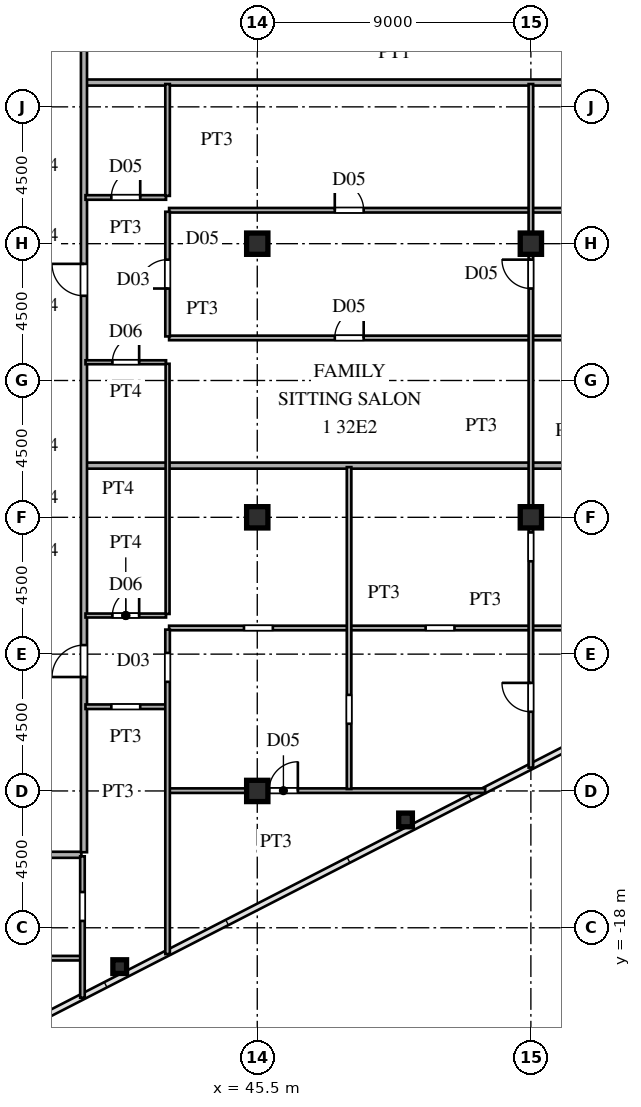
"""IFC4 building model, lengths in metres.
Left out: names, types, materials, properties, quantities, classifications, styles, units other than length and angle.
Written with IfcOpenShell. Run it as: python <this file> out.ifc"""

import sys

from ifc_helpers import new_model, si_unit, direction, frame, frame_2d, origin, origin_2d, place, context, subcontext, project, spatial, rectangle, hollow_rectangle, i_section, extrude, source, transform, mapped, element, fill, save


model = new_model("IFC4")
c1 = context("Model", 3, precision=1e-05, world=origin(), true_north=direction((0.0, 1.0)))
c2 = subcontext(c1, "Body", "Model", "MODEL_VIEW")
j1 = project(units=[si_unit("LENGTHUNIT", "METRE"), si_unit("PLANEANGLEUNIT", "RADIAN")], contexts=[c1])
p1 = place(None, origin())
s1 = spatial("IfcSite", under=j1, at=p1, CompositionType="ELEMENT")
p2 = place(p1, origin())
s2 = spatial("IfcBuilding", under=s1, at=p2, CompositionType="ELEMENT")
p3 = place(p2, frame((0.0, 0.0, 121.2)))
s3 = spatial("IfcBuildingStorey", under=s2, at=p3, CompositionType="ELEMENT", Elevation=121.2)
m1 = source(origin(), c2, "Body", "SweptSolid", [
    extrude(i_section(OverallWidth=0.7, OverallDepth=0.7, WebThickness=0.028, FlangeThickness=0.045, at=origin_2d()), origin(), (0.0, 0.0, 1.0), 3.6),
])
for number, where, z_axis, x_axis in (
    (1, (45.5, -13.5, 0.0), (0.0, 0.0, 1.0), (1.0, 0.0, 0.0)),
    (2, (45.5, -4.5, 0.0), (0.0, 0.0, 1.0), (1.0, 0.0, 0.0)),
    (3, (45.5, 4.5, 0.0), (0.0, 0.0, 1.0), (1.0, 0.0, 0.0)),
    (4, (54.5, -4.5, 0.0), (0.0, 0.0, 1.0), (1.0, 0.0, 0.0)),
    (5, (54.5, 4.5, 0.0), (0.0, 0.0, 1.0), (1.0, 0.0, 0.0)),
):
    element("IfcColumn", number, at=place(p3, frame(where, z_axis=z_axis, x_axis=x_axis)), inside=s3, PredefinedType="COLUMN", context=c2, shape_type="MappedRepresentation", body=[
        mapped(m1, transform((0.0, 0.0, 0.0), scale=1.0)),
    ])
m2 = source(origin(), c2, "Body", "SweptSolid", [
    extrude(hollow_rectangle(XDim=0.45, YDim=0.45, WallThickness=0.018, at=origin_2d()), origin(), (0.0, 0.0, 1.0), 3.6),
])
for number, where, z_axis, x_axis in (
    (6, (40.976, -19.278, 0.0), (0.0, 0.0, 1.0), (1.0, 0.0, 0.0)),
    (7, (50.377, -14.453, 0.0), (0.0, 0.0, 1.0), (1.0, 0.0, 0.0)),
):
    element("IfcColumn", number, at=place(p3, frame(where, z_axis=z_axis, x_axis=x_axis)), inside=s3, PredefinedType="COLUMN", context=c2, shape_type="MappedRepresentation", body=[
        mapped(m2, transform((0.0, 0.0, 0.0), scale=1.0)),
    ])
p4 = place(p3, frame((27.465, -19.0, 0.0), z_axis=(0.0, 0.0, 1.0), x_axis=(1.0, 0.0, 0.0)))
e8 = element("IfcWall", 8, at=p4, inside=s3, PredefinedType="PARTITIONING", context=c2, shape_type="SweptSolid", body=[
    extrude(rectangle(XDim=12.235, YDim=0.15, at=frame_2d((6.117, 0.0))), origin(), (0.0, 0.0, 1.0), 3.38),
])
p5 = place(p4, frame((5.685, 0.0, 0.0)))
e9 = element("IfcOpeningElement", 9, at=p5, cuts=e8, PredefinedType="OPENING", context=c2, shape_type="SweptSolid", body=[
    extrude(rectangle(XDim=0.95, YDim=2.15, at=frame_2d((0.475, 1.075))), frame((0.0, 0.085, 0.0), z_axis=(0.0, -1.0, 0.0), x_axis=(1.0, 0.0, 0.0)), (0.0, 0.0, 1.0), 0.17),
])
p6 = place(p3, frame((36.585, -15.6, 0.0), z_axis=(0.0, 0.0, 1.0), x_axis=(1.0, 0.0, 0.0)))
e10 = element("IfcWall", 10, at=p6, inside=s3, PredefinedType="PARTITIONING", context=c2, shape_type="SweptSolid", body=[
    extrude(rectangle(XDim=3.13, YDim=0.2, at=frame_2d((1.565, 0.0))), origin(), (0.0, 0.0, 1.0), 3.38),
])
p7 = place(p3, frame((42.6, -13.49, 0.0), z_axis=(0.0, 0.0, 1.0), x_axis=(1.0, 0.0, 0.0)))
e11 = element("IfcWall", 11, at=p7, inside=s3, PredefinedType="PARTITIONING", context=c2, shape_type="SweptSolid", body=[
    extrude(rectangle(XDim=10.397, YDim=0.15, at=frame_2d((5.198, 0.0))), origin(), (0.0, 0.0, 1.0), 2.78),
])
p8 = place(p7, frame((3.285, 0.0, 0.0)))
e12 = element("IfcOpeningElement", 12, at=p8, cuts=e11, PredefinedType="OPENING", context=c2, shape_type="SweptSolid", body=[
    extrude(rectangle(XDim=0.95, YDim=2.15, at=frame_2d((0.475, 1.075))), frame((0.0, 0.085, 0.0), z_axis=(0.0, -1.0, 0.0), x_axis=(1.0, 0.0, 0.0)), (0.0, 0.0, 1.0), 0.17),
])
p9 = place(p3, frame((39.85, -10.73, 0.0), z_axis=(0.0, 0.0, 1.0), x_axis=(1.0, 0.0, 0.0)))
e13 = element("IfcWall", 13, at=p9, inside=s3, PredefinedType="PARTITIONING", context=c2, shape_type="SweptSolid", body=[
    extrude(rectangle(XDim=2.65, YDim=0.15, at=frame_2d((1.325, 0.0))), origin(), (0.0, 0.0, 1.0), 3.38),
])
p10 = place(p9, frame((0.85, 0.0, 0.0)))
e14 = element("IfcOpeningElement", 14, at=p10, cuts=e13, PredefinedType="OPENING", context=c2, shape_type="SweptSolid", body=[
    extrude(rectangle(XDim=0.95, YDim=2.15, at=frame_2d((0.475, 1.075))), frame((0.0, 0.085, 0.0), z_axis=(0.0, -1.0, 0.0), x_axis=(1.0, 0.0, 0.0)), (0.0, 0.0, 1.0), 0.17),
])
p11 = place(p3, frame((42.6, -8.14, 0.0), z_axis=(0.0, 0.0, 1.0), x_axis=(1.0, 0.0, 0.0)))
e15 = element("IfcWall", 15, at=p11, inside=s3, PredefinedType="PARTITIONING", context=c2, shape_type="SweptSolid", body=[
    extrude(rectangle(XDim=20.81, YDim=0.15, at=frame_2d((10.405, 0.0))), origin(), (0.0, 0.0, 1.0), 3.38),
])
p12 = place(p11, frame((2.462, 0.0, 0.0)))
e16 = element("IfcOpeningElement", 16, at=p12, cuts=e15, PredefinedType="OPENING", context=c2, shape_type="SweptSolid", body=[
    extrude(rectangle(XDim=0.95, YDim=2.15, at=frame_2d((0.475, 1.075))), frame((0.0, 0.085, 0.0), z_axis=(0.0, -1.0, 0.0), x_axis=(1.0, 0.0, 0.0)), (0.0, 0.0, 1.0), 0.17),
])
p13 = place(p11, frame((8.438, 0.0, 0.0)))
e17 = element("IfcOpeningElement", 17, at=p13, cuts=e15, PredefinedType="OPENING", context=c2, shape_type="SweptSolid", body=[
    extrude(rectangle(XDim=0.95, YDim=2.15, at=frame_2d((0.475, 1.075))), frame((0.0, 0.085, 0.0), z_axis=(0.0, -1.0, 0.0), x_axis=(1.0, 0.0, 0.0)), (0.0, 0.0, 1.0), 0.17),
])
p14 = place(p3, frame((39.85, -7.73, 0.0), z_axis=(0.0, 0.0, 1.0), x_axis=(1.0, 0.0, 0.0)))
e18 = element("IfcWall", 18, at=p14, inside=s3, PredefinedType="PARTITIONING", context=c2, shape_type="SweptSolid", body=[
    extrude(rectangle(XDim=2.65, YDim=0.13, at=frame_2d((1.325, 0.0))), origin(), (0.0, 0.0, 1.0), 3.38),
])
p15 = place(p14, frame((0.885, 0.0, 0.0)))
e19 = element("IfcOpeningElement", 19, at=p15, cuts=e18, PredefinedType="OPENING", context=c2, shape_type="SweptSolid", body=[
    extrude(rectangle(XDim=0.88, YDim=2.1, at=frame_2d((0.44, 1.05))), frame((0.0, 0.075, 0.0), z_axis=(0.0, -1.0, 0.0), x_axis=(1.0, 0.0, 0.0)), (0.0, 0.0, 1.0), 0.15),
])
p16 = place(p3, frame((39.88, -2.8, 0.0), z_axis=(0.0, 0.0, 1.0), x_axis=(1.0, 0.0, 0.0)))
e20 = element("IfcWall", 20, at=p16, inside=s3, PredefinedType="PARTITIONING", context=c2, shape_type="SweptSolid", body=[
    extrude(rectangle(XDim=29.625, YDim=0.2, at=frame_2d((14.812, 0.0))), origin(), (0.0, 0.0, 1.0), 3.38),
])
p17 = place(p3, frame((39.85, 0.6, 0.0), z_axis=(0.0, 0.0, 1.0), x_axis=(1.0, 0.0, 0.0)))
e21 = element("IfcWall", 21, at=p17, inside=s3, PredefinedType="PARTITIONING", context=c2, shape_type="SweptSolid", body=[
    extrude(rectangle(XDim=2.65, YDim=0.13, at=frame_2d((1.325, 0.0))), origin(), (0.0, 0.0, 1.0), 3.38),
])
p18 = place(p17, frame((0.885, 0.0, 0.0)))
e22 = element("IfcOpeningElement", 22, at=p18, cuts=e21, PredefinedType="OPENING", context=c2, shape_type="SweptSolid", body=[
    extrude(rectangle(XDim=0.88, YDim=2.1, at=frame_2d((0.44, 1.05))), frame((0.0, 0.075, 0.0), z_axis=(0.0, -1.0, 0.0), x_axis=(1.0, 0.0, 0.0)), (0.0, 0.0, 1.0), 0.15),
])
p19 = place(p3, frame((42.6, 1.4, 0.0), z_axis=(0.0, 0.0, 1.0), x_axis=(1.0, 0.0, 0.0)))
e23 = element("IfcWall", 23, at=p19, inside=s3, PredefinedType="PARTITIONING", context=c2, shape_type="SweptSolid", body=[
    extrude(rectangle(XDim=26.935, YDim=0.15, at=frame_2d((13.467, 0.0))), origin(), (0.0, 0.0, 1.0), 3.38),
])
p20 = place(p19, frame((5.45, 0.0, 0.0)))
e24 = element("IfcOpeningElement", 24, at=p20, cuts=e23, PredefinedType="OPENING", context=c2, shape_type="SweptSolid", body=[
    extrude(rectangle(XDim=0.95, YDim=2.15, at=frame_2d((0.475, 1.075))), frame((0.0, 0.085, 0.0), z_axis=(0.0, -1.0, 0.0), x_axis=(1.0, 0.0, 0.0)), (0.0, 0.0, 1.0), 0.17),
])
p21 = place(p19, frame((14.275, 0.0, 0.0)))
e25 = element("IfcOpeningElement", 25, at=p21, cuts=e23, PredefinedType="OPENING", context=c2, shape_type="SweptSolid", body=[
    extrude(rectangle(XDim=0.95, YDim=2.15, at=frame_2d((0.475, 1.075))), frame((0.0, 0.085, 0.0), z_axis=(0.0, -1.0, 0.0), x_axis=(1.0, 0.0, 0.0)), (0.0, 0.0, 1.0), 0.17),
])
p22 = place(p3, frame((42.6, 5.6, 0.0), z_axis=(0.0, 0.0, 1.0), x_axis=(1.0, 0.0, 0.0)))
e26 = element("IfcWall", 26, at=p22, inside=s3, PredefinedType="PARTITIONING", context=c2, shape_type="SweptSolid", body=[
    extrude(rectangle(XDim=25.766, YDim=0.15, at=frame_2d((12.883, 0.0))), origin(), (0.0, 0.0, 1.0), 3.38),
])
p23 = place(p22, frame((5.45, 0.0, 0.0)))
e27 = element("IfcOpeningElement", 27, at=p23, cuts=e26, PredefinedType="OPENING", context=c2, shape_type="SweptSolid", body=[
    extrude(rectangle(XDim=0.95, YDim=2.15, at=frame_2d((0.475, 1.075))), frame((0.0, 0.085, 0.0), z_axis=(0.0, -1.0, 0.0), x_axis=(1.0, 0.0, 0.0)), (0.0, 0.0, 1.0), 0.17),
])
p24 = place(p22, frame((14.275, 0.0, 0.0)))
e28 = element("IfcOpeningElement", 28, at=p24, cuts=e26, PredefinedType="OPENING", context=c2, shape_type="SweptSolid", body=[
    extrude(rectangle(XDim=0.95, YDim=2.15, at=frame_2d((0.475, 1.075))), frame((0.0, 0.085, 0.0), z_axis=(0.0, -1.0, 0.0), x_axis=(1.0, 0.0, 0.0)), (0.0, 0.0, 1.0), 0.17),
])
p25 = place(p3, frame((39.85, 6.02, 0.0), z_axis=(0.0, 0.0, 1.0), x_axis=(1.0, 0.0, 0.0)))
e29 = element("IfcWall", 29, at=p25, inside=s3, PredefinedType="PARTITIONING", context=c2, shape_type="SweptSolid", body=[
    extrude(rectangle(XDim=2.65, YDim=0.15, at=frame_2d((1.325, 0.0))), origin(), (0.0, 0.0, 1.0), 3.38),
])
p26 = place(p25, frame((0.85, 0.0, 0.0)))
e30 = element("IfcOpeningElement", 30, at=p26, cuts=e29, PredefinedType="OPENING", context=c2, shape_type="SweptSolid", body=[
    extrude(rectangle(XDim=0.95, YDim=2.15, at=frame_2d((0.475, 1.075))), frame((0.0, 0.085, 0.0), z_axis=(0.0, -1.0, 0.0), x_axis=(1.0, 0.0, 0.0)), (0.0, 0.0, 1.0), 0.17),
])
p27 = place(p3, frame((39.88, 9.8, 0.0), z_axis=(0.0, 0.0, 1.0), x_axis=(1.0, 0.0, 0.0)))
e31 = element("IfcWall", 31, at=p27, inside=s3, PredefinedType="PARTITIONING", context=c2, shape_type="SweptSolid", body=[
    extrude(rectangle(XDim=20.277, YDim=0.2, at=frame_2d((10.139, 0.0))), origin(), (0.0, 0.0, 1.0), 3.38),
])
p28 = place(p3, frame((39.75, -20.301, 0.0), z_axis=(0.0, 0.0, 1.0), x_axis=(0.0, 1.0, 0.0)))
e32 = element("IfcWall", 32, at=p28, inside=s3, PredefinedType="PARTITIONING", context=c2, shape_type="SweptSolid", body=[
    extrude(rectangle(XDim=4.651, YDim=0.15, at=frame_2d((2.326, 0.0))), origin(), (0.0, 0.0, 1.0), 3.38),
])
p29 = place(p28, frame((2.526, 0.0, 0.0)))
e33 = element("IfcOpeningElement", 33, at=p29, cuts=e32, PredefinedType="OPENING", context=c2, shape_type="SweptSolid", body=[
    extrude(rectangle(XDim=0.95, YDim=2.15, at=frame_2d((0.475, 1.075))), frame((0.0, 0.085, 0.0), z_axis=(0.0, -1.0, 0.0), x_axis=(1.0, 0.0, 0.0)), (0.0, 0.0, 1.0), 0.17),
])
p30 = place(p3, frame((39.8, -15.515, 0.0), z_axis=(0.0, 0.0, 1.0), x_axis=(0.0, 1.0, 0.0)))
e34 = element("IfcWall", 34, at=p30, inside=s3, PredefinedType="PARTITIONING", context=c2, shape_type="SweptSolid", body=[
    extrude(rectangle(XDim=31.03, YDim=0.2, at=frame_2d((15.515, 0.0))), origin(), (0.0, 0.0, 1.0), 3.38),
])
p31 = place(p30, frame((5.762, 0.0, 0.0)))
e35 = element("IfcOpeningElement", 35, at=p31, cuts=e34, PredefinedType="OPENING", context=c2, shape_type="SweptSolid", body=[
    extrude(rectangle(XDim=1.05, YDim=2.25, at=frame_2d((0.525, 1.125))), frame((0.0, 0.11, 0.0), z_axis=(0.0, -1.0, 0.0), x_axis=(1.0, 0.0, 0.0)), (0.0, 0.0, 1.0), 0.22),
])
p32 = place(p30, frame((18.301, 0.0, 0.0)))
e36 = element("IfcOpeningElement", 36, at=p32, cuts=e34, PredefinedType="OPENING", context=c2, shape_type="SweptSolid", body=[
    extrude(rectangle(XDim=1.05, YDim=2.25, at=frame_2d((0.525, 1.125))), frame((0.0, 0.11, 0.0), z_axis=(0.0, -1.0, 0.0), x_axis=(1.0, 0.0, 0.0)), (0.0, 0.0, 1.0), 0.22),
])
p33 = place(p30, frame((27.69, 0.0, 0.0)))
e37 = element("IfcOpeningElement", 37, at=p33, cuts=e34, PredefinedType="OPENING", context=c2, shape_type="SweptSolid", body=[
    extrude(rectangle(XDim=1.05, YDim=2.25, at=frame_2d((0.525, 1.125))), frame((0.0, 0.11, 0.0), z_axis=(0.0, -1.0, 0.0), x_axis=(1.0, 0.0, 0.0)), (0.0, 0.0, 1.0), 0.22),
])
p34 = place(p3, frame((42.55, -18.865, 0.0), z_axis=(0.0, 0.0, 1.0), x_axis=(0.0, 1.0, 0.0)))
e38 = element("IfcWall", 38, at=p34, inside=s3, PredefinedType="PARTITIONING", context=c2, shape_type="SweptSolid", body=[
    extrude(rectangle(XDim=10.672, YDim=0.15, at=frame_2d((5.336, 0.0))), origin(), (0.0, 0.0, 1.0), 3.38),
])
p35 = place(p34, frame((8.955, 0.0, 0.0)))
e39 = element("IfcOpeningElement", 39, at=p35, cuts=e38, PredefinedType="OPENING", context=c2, shape_type="SweptSolid", body=[
    extrude(rectangle(XDim=0.95, YDim=2.15, at=frame_2d((0.475, 1.075))), frame((0.0, 0.085, 0.0), z_axis=(0.0, -1.0, 0.0), x_axis=(1.0, 0.0, 0.0)), (0.0, 0.0, 1.0), 0.17),
])
p36 = place(p3, frame((42.55, -7.678, 0.0), z_axis=(0.0, 0.0, 1.0), x_axis=(0.0, 1.0, 0.0)))
e40 = element("IfcWall", 40, at=p36, inside=s3, PredefinedType="PARTITIONING", context=c2, shape_type="SweptSolid", body=[
    extrude(rectangle(XDim=8.228, YDim=0.13, at=frame_2d((4.114, 0.0))), origin(), (0.0, 0.0, 1.0), 3.38),
])
p37 = place(p3, frame((42.55, 1.45, 0.0), z_axis=(0.0, 0.0, 1.0), x_axis=(0.0, 1.0, 0.0)))
e41 = element("IfcWall", 41, at=p37, inside=s3, PredefinedType="PARTITIONING", context=c2, shape_type="SweptSolid", body=[
    extrude(rectangle(XDim=4.1, YDim=0.15, at=frame_2d((2.05, 0.0))), origin(), (0.0, 0.0, 1.0), 3.38),
])
p38 = place(p37, frame((1.575, 0.0, 0.0)))
e42 = element("IfcOpeningElement", 42, at=p38, cuts=e41, PredefinedType="OPENING", context=c2, shape_type="SweptSolid", body=[
    extrude(rectangle(XDim=0.95, YDim=2.15, at=frame_2d((0.475, 1.075))), frame((0.0, 0.085, 0.0), z_axis=(0.0, -1.0, 0.0), x_axis=(1.0, 0.0, 0.0)), (0.0, 0.0, 1.0), 0.17),
])
p39 = place(p3, frame((42.55, 6.072, 0.0), z_axis=(0.0, 0.0, 1.0), x_axis=(0.0, 1.0, 0.0)))
e43 = element("IfcWall", 43, at=p39, inside=s3, PredefinedType="PARTITIONING", context=c2, shape_type="SweptSolid", body=[
    extrude(rectangle(XDim=3.678, YDim=0.15, at=frame_2d((1.839, 0.0))), origin(), (0.0, 0.0, 1.0), 3.38),
])
p40 = place(p3, frame((48.52, -13.436, 0.0), z_axis=(0.0, 0.0, 1.0), x_axis=(0.0, 1.0, 0.0)))
e44 = element("IfcWall", 44, at=p40, inside=s3, PredefinedType="PARTITIONING", context=c2, shape_type="SweptSolid", body=[
    extrude(rectangle(XDim=10.586, YDim=0.15, at=frame_2d((5.293, 0.0))), origin(), (0.0, 0.0, 1.0), 3.38),
])
p41 = place(p40, frame((2.146, 0.0, 0.0)))
e45 = element("IfcOpeningElement", 45, at=p41, cuts=e44, PredefinedType="OPENING", context=c2, shape_type="SweptSolid", body=[
    extrude(rectangle(XDim=0.95, YDim=2.15, at=frame_2d((0.475, 1.075))), frame((0.0, 0.085, 0.0), z_axis=(0.0, -1.0, 0.0), x_axis=(1.0, 0.0, 0.0)), (0.0, 0.0, 1.0), 0.17),
])
p42 = place(p3, frame((54.5, -12.732, 0.0), z_axis=(0.0, 0.0, 1.0), x_axis=(0.0, 1.0, 0.0)))
e46 = element("IfcWall", 46, at=p42, inside=s3, PredefinedType="PARTITIONING", context=c2, shape_type="SweptSolid", body=[
    extrude(rectangle(XDim=22.482, YDim=0.15, at=frame_2d((11.241, 0.0))), origin(), (0.0, 0.0, 1.0), 2.78),
])
p43 = place(p42, frame((1.837, 0.0, 0.0)))
e47 = element("IfcOpeningElement", 47, at=p43, cuts=e46, PredefinedType="OPENING", context=c2, shape_type="SweptSolid", body=[
    extrude(rectangle(XDim=0.95, YDim=2.15, at=frame_2d((0.475, 1.075))), frame((0.0, 0.085, 0.0), z_axis=(0.0, -1.0, 0.0), x_axis=(1.0, 0.0, 0.0)), (0.0, 0.0, 1.0), 0.17),
])
p44 = place(p42, frame((6.785, 0.0, 0.0)))
e48 = element("IfcOpeningElement", 48, at=p44, cuts=e46, PredefinedType="OPENING", context=c2, shape_type="SweptSolid", body=[
    extrude(rectangle(XDim=0.95, YDim=2.15, at=frame_2d((0.475, 1.075))), frame((0.0, 0.085, 0.0), z_axis=(0.0, -1.0, 0.0), x_axis=(1.0, 0.0, 0.0)), (0.0, 0.0, 1.0), 0.17),
])
p45 = place(p42, frame((15.757, 0.0, 0.0)))
e49 = element("IfcOpeningElement", 49, at=p45, cuts=e46, PredefinedType="OPENING", context=c2, shape_type="SweptSolid", body=[
    extrude(rectangle(XDim=0.95, YDim=2.15, at=frame_2d((0.475, 1.075))), frame((0.0, 0.085, 0.0), z_axis=(0.0, -1.0, 0.0), x_axis=(1.0, 0.0, 0.0)), (0.0, 0.0, 1.0), 0.17),
])
m3 = source(origin(), c2, "Body", "SweptSolid", [
    extrude(rectangle(XDim=0.95, YDim=2.15, at=frame_2d((0.475, 1.075))), frame((0.0, 0.025, 0.0), z_axis=(0.0, -1.0, 0.0), x_axis=(1.0, 0.0, 0.0)), (0.0, 0.0, 1.0), 0.05),
])
p46 = place(p8, origin())
e50 = element("IfcDoor", 50, at=p46, inside=s3, OperationType="SINGLE_SWING_RIGHT", PredefinedType="DOOR", context=c2, shape_type="MappedRepresentation", body=[
    mapped(m3, transform((0.0, 0.0, 0.0), scale=1.0)),
])
fill(e12, e50)
m4 = source(origin(), c2, "Body", "SweptSolid", [
    extrude(rectangle(XDim=0.88, YDim=2.1, at=frame_2d((0.44, 1.05))), frame((0.0, 0.025, 0.0), z_axis=(0.0, -1.0, 0.0), x_axis=(1.0, 0.0, 0.0)), (0.0, 0.0, 1.0), 0.05),
])
p47 = place(p15, origin())
e51 = element("IfcDoor", 51, at=p47, inside=s3, OperationType="SINGLE_SWING_RIGHT", PredefinedType="DOOR", context=c2, shape_type="MappedRepresentation", body=[
    mapped(m4, transform((0.0, 0.0, 0.0), scale=1.0)),
])
fill(e19, e51)
p48 = place(p18, origin())
e52 = element("IfcDoor", 52, at=p48, inside=s3, OperationType="SINGLE_SWING_RIGHT", PredefinedType="DOOR", context=c2, shape_type="MappedRepresentation", body=[
    mapped(m4, transform((0.0, 0.0, 0.0), scale=1.0)),
])
fill(e22, e52)
p49 = place(p20, origin())
e53 = element("IfcDoor", 53, at=p49, inside=s3, OperationType="SINGLE_SWING_RIGHT", PredefinedType="DOOR", context=c2, shape_type="MappedRepresentation", body=[
    mapped(m3, transform((0.0, 0.0, 0.0), scale=1.0)),
])
fill(e24, e53)
p50 = place(p23, origin())
e54 = element("IfcDoor", 54, at=p50, inside=s3, OperationType="SINGLE_SWING_LEFT", PredefinedType="DOOR", context=c2, shape_type="MappedRepresentation", body=[
    mapped(m3, transform((0.0, 0.0, 0.0), scale=1.0)),
])
fill(e27, e54)
p51 = place(p26, origin())
e55 = element("IfcDoor", 55, at=p51, inside=s3, OperationType="SINGLE_SWING_RIGHT", PredefinedType="DOOR", context=c2, shape_type="MappedRepresentation", body=[
    mapped(m3, transform((0.0, 0.0, 0.0), scale=1.0)),
])
fill(e30, e55)
m5 = source(origin(), c2, "Body", "SweptSolid", [
    extrude(rectangle(XDim=1.05, YDim=2.25, at=frame_2d((0.525, 1.125))), frame((0.0, 0.025, 0.0), z_axis=(0.0, -1.0, 0.0), x_axis=(1.0, 0.0, 0.0)), (0.0, 0.0, 1.0), 0.05),
])
p52 = place(p31, origin())
e56 = element("IfcDoor", 56, at=p52, inside=s3, OperationType="SINGLE_SWING_LEFT", PredefinedType="DOOR", context=c2, shape_type="MappedRepresentation", body=[
    mapped(m5, transform((0.0, 0.0, 0.0), scale=1.0)),
])
fill(e35, e56)
p53 = place(p32, origin())
e57 = element("IfcDoor", 57, at=p53, inside=s3, OperationType="SINGLE_SWING_RIGHT", PredefinedType="DOOR", context=c2, shape_type="MappedRepresentation", body=[
    mapped(m5, transform((0.0, 0.0, 0.0), scale=1.0)),
])
fill(e36, e57)
p54 = place(p38, origin())
e58 = element("IfcDoor", 58, at=p54, inside=s3, OperationType="SINGLE_SWING_LEFT", PredefinedType="DOOR", context=c2, shape_type="MappedRepresentation", body=[
    mapped(m3, transform((0.0, 0.0, 0.0), scale=1.0)),
])
fill(e42, e58)
p55 = place(p43, origin())
e59 = element("IfcDoor", 59, at=p55, inside=s3, OperationType="SINGLE_SWING_RIGHT", PredefinedType="DOOR", context=c2, shape_type="MappedRepresentation", body=[
    mapped(m3, transform((0.0, 0.0, 0.0), scale=1.0)),
])
fill(e47, e59)
p56 = place(p45, origin())
e60 = element("IfcDoor", 60, at=p56, inside=s3, OperationType="SINGLE_SWING_RIGHT", PredefinedType="DOOR", context=c2, shape_type="MappedRepresentation", body=[
    mapped(m3, transform((0.0, 0.0, 0.0), scale=1.0)),
])
fill(e49, e60)
save(model, sys.argv[1])
